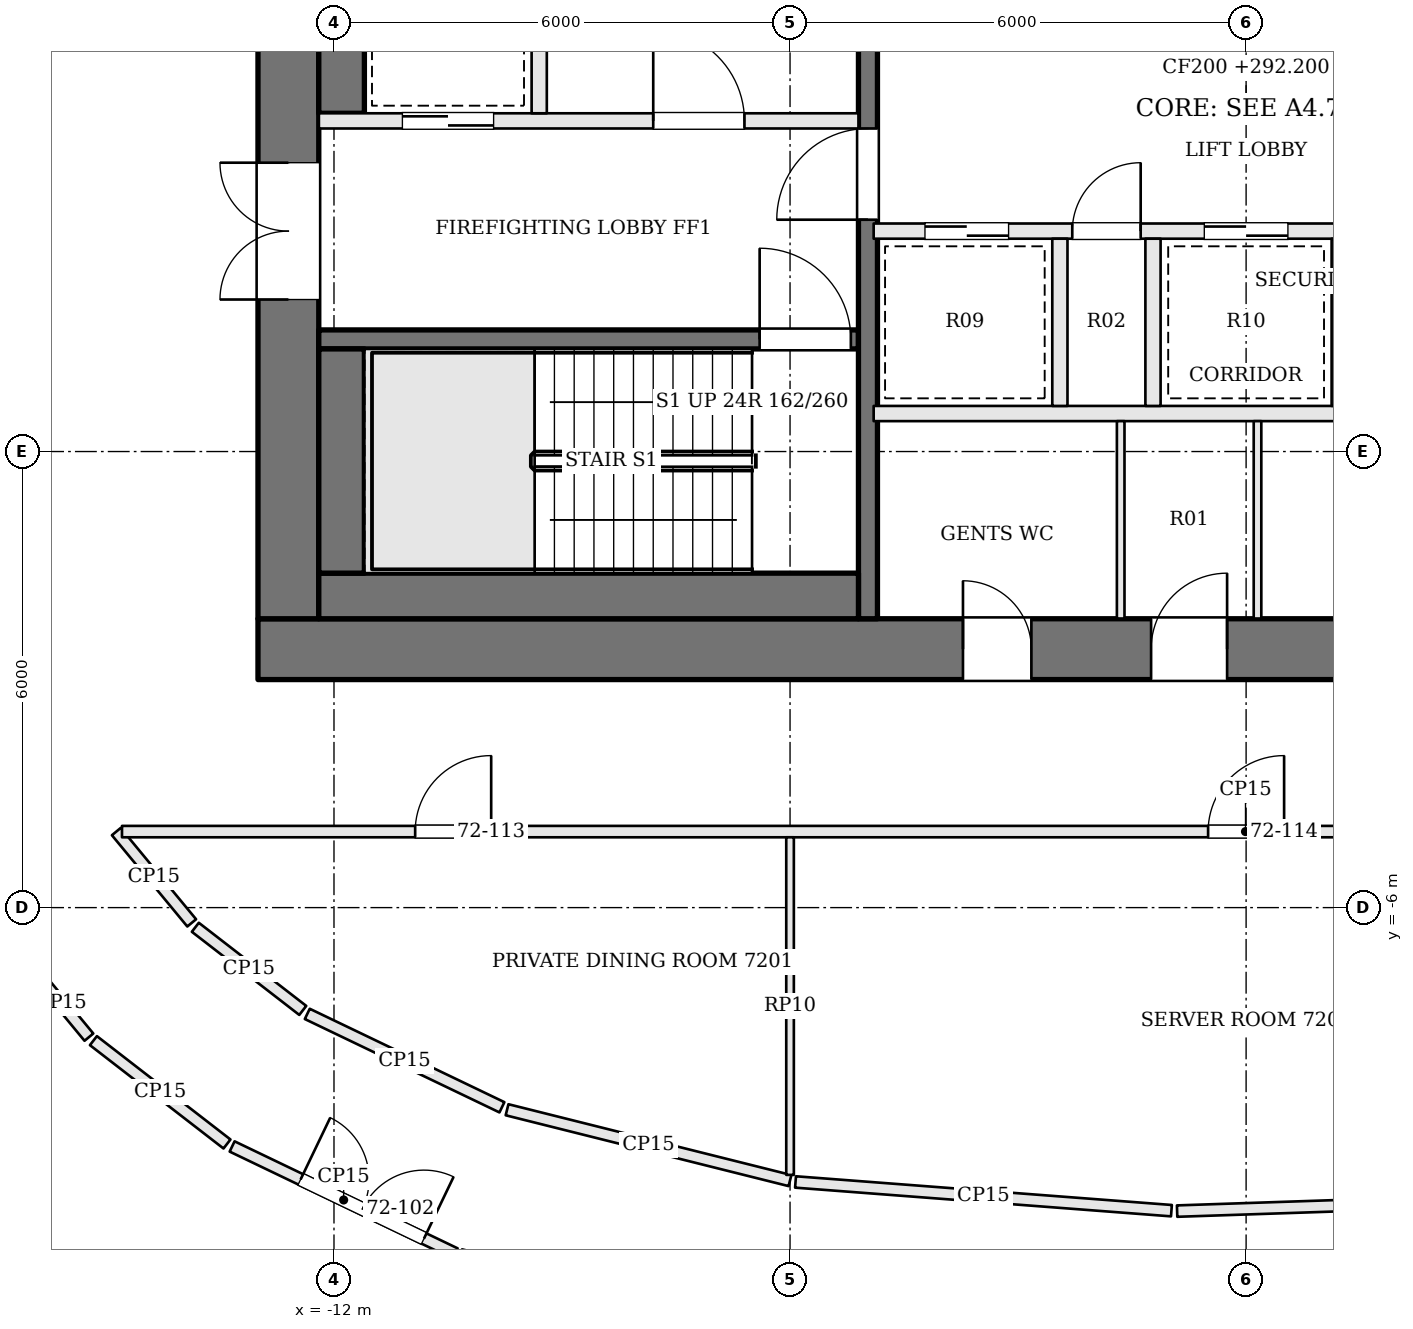
"""IFC4 building model, lengths in metres.
Left out: names, types, materials, properties, quantities, classifications, styles, units other than length and angle.
Written with IfcOpenShell. Run it as: python <this file> out.ifc"""

import sys

from ifc_helpers import new_model, si_unit, direction, frame, frame_2d, origin, place, context, subcontext, project, spatial, rectangle, extrude, element, fill, save


model = new_model("IFC4")
c1 = context("Model", 3, precision=1e-05, world=origin(), true_north=direction((0.0, 1.0)))
c2 = subcontext(c1, "Body", "Model", "MODEL_VIEW")
j1 = project(units=[si_unit("LENGTHUNIT", "METRE"), si_unit("PLANEANGLEUNIT", "RADIAN")], contexts=[c1])
p1 = place(None, origin())
s1 = spatial("IfcSite", under=j1, at=p1, CompositionType="ELEMENT")
p2 = place(p1, origin())
s2 = spatial("IfcBuilding", under=s1, at=p2, CompositionType="ELEMENT")
p3 = place(p2, frame((0.0, 0.0, 292.2)))
s3 = spatial("IfcBuildingStorey", under=s2, at=p3, CompositionType="ELEMENT", Elevation=292.2)
p4 = place(p3, frame((-13.0, -2.6, 0.0), z_axis=(0.0, 0.0, 1.0), x_axis=(1.0, 0.0, 0.0)))
e1 = element("IfcWall", 1, at=p4, inside=s3, PredefinedType="SHEAR", context=c2, shape_type="SweptSolid", body=[
    extrude(rectangle(XDim=26.0, YDim=0.8, at=frame_2d((13.0, 0.0))), origin(), (0.0, 0.0, 1.0), 3.9),
])
p5 = place(p4, frame((9.275, 0.0, 0.0)))
e2 = element("IfcOpeningElement", 2, at=p5, cuts=e1, PredefinedType="OPENING", context=c2, shape_type="SweptSolid", body=[
    extrude(rectangle(XDim=0.9, YDim=2.1, at=frame_2d((0.45, 1.05))), frame((0.0, 0.41, 0.0), z_axis=(0.0, -1.0, 0.0), x_axis=(1.0, 0.0, 0.0)), (0.0, 0.0, 1.0), 0.82),
])
p6 = place(p4, frame((11.75, 0.0, 0.0)))
e3 = element("IfcOpeningElement", 3, at=p6, cuts=e1, PredefinedType="OPENING", context=c2, shape_type="SweptSolid", body=[
    extrude(rectangle(XDim=1.0, YDim=2.1, at=frame_2d((0.5, 1.05))), frame((0.0, 0.41, 0.0), z_axis=(0.0, -1.0, 0.0), x_axis=(1.0, 0.0, 0.0)), (0.0, 0.0, 1.0), 0.82),
])
p7 = place(p4, frame((14.325, 0.0, 0.0)))
e4 = element("IfcOpeningElement", 4, at=p7, cuts=e1, PredefinedType="OPENING", context=c2, shape_type="SweptSolid", body=[
    extrude(rectangle(XDim=0.9, YDim=2.1, at=frame_2d((0.45, 1.05))), frame((0.0, 0.41, 0.0), z_axis=(0.0, -1.0, 0.0), x_axis=(1.0, 0.0, 0.0)), (0.0, 0.0, 1.0), 0.82),
])
p8 = place(p4, frame((16.7, 0.0, 0.0)))
e5 = element("IfcOpeningElement", 5, at=p8, cuts=e1, PredefinedType="OPENING", context=c2, shape_type="SweptSolid", body=[
    extrude(rectangle(XDim=0.9, YDim=2.1, at=frame_2d((0.45, 1.05))), frame((0.0, 0.41, 0.0), z_axis=(0.0, -1.0, 0.0), x_axis=(1.0, 0.0, 0.0)), (0.0, 0.0, 1.0), 0.82),
])
p9 = place(p3, frame((-12.6, -2.2, 0.0), z_axis=(0.0, 0.0, 1.0), x_axis=(0.0, 1.0, 0.0)))
e6 = element("IfcWall", 6, at=p9, inside=s3, PredefinedType="SHEAR", context=c2, shape_type="SweptSolid", body=[
    extrude(rectangle(XDim=13.4, YDim=0.8, at=frame_2d((6.7, 0.0))), origin(), (0.0, 0.0, 1.0), 3.9),
])
p10 = place(p9, frame((4.2, 0.0, 0.0)))
e7 = element("IfcOpeningElement", 7, at=p10, cuts=e6, PredefinedType="OPENING", context=c2, shape_type="SweptSolid", body=[
    extrude(rectangle(XDim=1.8, YDim=2.1, at=frame_2d((0.9, 1.05))), frame((0.0, 0.41, 0.0), z_axis=(0.0, -1.0, 0.0), x_axis=(1.0, 0.0, 0.0)), (0.0, 0.0, 1.0), 0.82),
])
p11 = place(p3, frame((-12.2, 1.475, 0.0), z_axis=(0.0, 0.0, 1.0), x_axis=(1.0, 0.0, 0.0)))
e8 = element("IfcWall", 8, at=p11, inside=s3, PredefinedType="SOLIDWALL", context=c2, shape_type="SweptSolid", body=[
    extrude(rectangle(XDim=7.1, YDim=0.25, at=frame_2d((3.55, 0.0))), origin(), (0.0, 0.0, 1.0), 3.7),
])
p12 = place(p11, frame((5.8, 0.0, 0.0)))
e9 = element("IfcOpeningElement", 9, at=p12, cuts=e8, PredefinedType="OPENING", context=c2, shape_type="SweptSolid", body=[
    extrude(rectangle(XDim=1.2, YDim=2.1, at=frame_2d((0.6, 1.05))), frame((0.0, 0.135, 0.0), z_axis=(0.0, -1.0, 0.0), x_axis=(1.0, 0.0, 0.0)), (0.0, 0.0, 1.0), 0.27),
])
p13 = place(p3, frame((-12.2, 4.35, 0.0), z_axis=(0.0, 0.0, 1.0), x_axis=(1.0, 0.0, 0.0)))
e10 = element("IfcWall", 10, at=p13, inside=s3, PredefinedType="SOLIDWALL", context=c2, shape_type="SweptSolid", body=[
    extrude(rectangle(XDim=7.1, YDim=0.2, at=frame_2d((3.55, 0.0))), origin(), (0.0, 0.0, 1.0), 3.7),
])
p14 = place(p13, frame((4.4, 0.0, 0.0)))
e11 = element("IfcOpeningElement", 11, at=p14, cuts=e10, PredefinedType="OPENING", context=c2, shape_type="SweptSolid", body=[
    extrude(rectangle(XDim=1.2, YDim=2.1, at=frame_2d((0.6, 1.05))), frame((0.0, 0.11, 0.0), z_axis=(0.0, -1.0, 0.0), x_axis=(1.0, 0.0, 0.0)), (0.0, 0.0, 1.0), 0.22),
])
p15 = place(p13, frame((1.1, 0.0, 0.0)))
e12 = element("IfcOpeningElement", 12, at=p15, cuts=e10, PredefinedType="OPENING", context=c2, shape_type="SweptSolid", body=[
    extrude(rectangle(XDim=1.2, YDim=2.1, at=frame_2d((0.6, 1.05))), frame((0.0, 0.11, 0.0), z_axis=(0.0, -1.0, 0.0), x_axis=(1.0, 0.0, 0.0)), (0.0, 0.0, 1.0), 0.22),
])
p16 = place(p3, frame((-9.3, 4.45, 0.0), z_axis=(0.0, 0.0, 1.0), x_axis=(0.0, 1.0, 0.0)))
e13 = element("IfcWall", 13, at=p16, inside=s3, PredefinedType="SOLIDWALL", context=c2, shape_type="SweptSolid", body=[
    extrude(rectangle(XDim=3.0, YDim=0.2, at=frame_2d((1.5, 0.0))), origin(), (0.0, 0.0, 1.0), 3.7),
])
p17 = place(p3, frame((-4.975, -2.2, 0.0), z_axis=(0.0, 0.0, 1.0), x_axis=(0.0, 1.0, 0.0)))
e14 = element("IfcWall", 14, at=p17, inside=s3, PredefinedType="SOLIDWALL", context=c2, shape_type="SweptSolid", body=[
    extrude(rectangle(XDim=13.4, YDim=0.25, at=frame_2d((6.7, 0.0))), origin(), (0.0, 0.0, 1.0), 3.7),
])
p18 = place(p17, frame((5.25, 0.0, 0.0)))
e15 = element("IfcOpeningElement", 15, at=p18, cuts=e14, PredefinedType="OPENING", context=c2, shape_type="SweptSolid", body=[
    extrude(rectangle(XDim=1.2, YDim=2.1, at=frame_2d((0.6, 1.05))), frame((0.0, 0.135, 0.0), z_axis=(0.0, -1.0, 0.0), x_axis=(1.0, 0.0, 0.0)), (0.0, 0.0, 1.0), 0.27),
])
p19 = place(p3, frame((-12.2, -1.9, 0.0), z_axis=(0.0, 0.0, 1.0), x_axis=(1.0, 0.0, 0.0)))
e16 = element("IfcWall", 16, at=p19, inside=s3, PredefinedType="SOLIDWALL", context=c2, shape_type="SweptSolid", body=[
    extrude(rectangle(XDim=7.1, YDim=0.6, at=frame_2d((3.55, 0.0))), origin(), (0.0, 0.0, 1.0), 3.7),
])
p20 = place(p3, frame((-11.9, -1.6, 0.0), z_axis=(0.0, 0.0, 1.0), x_axis=(0.0, 1.0, 0.0)))
e17 = element("IfcWall", 17, at=p20, inside=s3, PredefinedType="SOLIDWALL", context=c2, shape_type="SweptSolid", body=[
    extrude(rectangle(XDim=2.95, YDim=0.6, at=frame_2d((1.475, 0.0))), origin(), (0.0, 0.0, 1.0), 3.7),
])
p21 = place(p3, frame((-11.9, 4.45, 0.0), z_axis=(0.0, 0.0, 1.0), x_axis=(0.0, 1.0, 0.0)))
e18 = element("IfcWall", 18, at=p21, inside=s3, PredefinedType="SOLIDWALL", context=c2, shape_type="SweptSolid", body=[
    extrude(rectangle(XDim=3.0, YDim=0.6, at=frame_2d((1.5, 0.0))), origin(), (0.0, 0.0, 1.0), 3.7),
])
p22 = place(p3, frame((-4.9, 0.5, 0.0), z_axis=(0.0, 0.0, 1.0), x_axis=(1.0, 0.0, 0.0)))
e19 = element("IfcWall", 19, at=p22, inside=s3, PredefinedType="SOLIDWALL", context=c2, shape_type="SweptSolid", body=[
    extrude(rectangle(XDim=9.8, YDim=0.2, at=frame_2d((4.9, 0.0))), origin(), (0.0, 0.0, 1.0), 3.7),
])
p23 = place(p3, frame((-4.9, 2.9, 0.0), z_axis=(0.0, 0.0, 1.0), x_axis=(1.0, 0.0, 0.0)))
e20 = element("IfcWall", 20, at=p23, inside=s3, PredefinedType="SOLIDWALL", context=c2, shape_type="SweptSolid", body=[
    extrude(rectangle(XDim=9.8, YDim=0.2, at=frame_2d((4.9, 0.0))), origin(), (0.0, 0.0, 1.0), 3.7),
])
p24 = place(p23, frame((0.675, 0.0, 0.0)))
e21 = element("IfcOpeningElement", 21, at=p24, cuts=e20, PredefinedType="OPENING", context=c2, shape_type="SweptSolid", body=[
    extrude(rectangle(XDim=1.1, YDim=2.1, at=frame_2d((0.55, 1.05))), frame((0.0, 0.11, 0.0), z_axis=(0.0, -1.0, 0.0), x_axis=(1.0, 0.0, 0.0)), (0.0, 0.0, 1.0), 0.22),
])
p25 = place(p23, frame((2.613, 0.0, 0.0)))
e22 = element("IfcOpeningElement", 22, at=p25, cuts=e20, PredefinedType="OPENING", context=c2, shape_type="SweptSolid", body=[
    extrude(rectangle(XDim=0.9, YDim=2.1, at=frame_2d((0.45, 1.05))), frame((0.0, 0.11, 0.0), z_axis=(0.0, -1.0, 0.0), x_axis=(1.0, 0.0, 0.0)), (0.0, 0.0, 1.0), 0.22),
])
p26 = place(p23, frame((4.35, 0.0, 0.0)))
e23 = element("IfcOpeningElement", 23, at=p26, cuts=e20, PredefinedType="OPENING", context=c2, shape_type="SweptSolid", body=[
    extrude(rectangle(XDim=1.1, YDim=2.1, at=frame_2d((0.55, 1.05))), frame((0.0, 0.11, 0.0), z_axis=(0.0, -1.0, 0.0), x_axis=(1.0, 0.0, 0.0)), (0.0, 0.0, 1.0), 0.22),
])
p27 = place(p23, frame((7.463, 0.0, 0.0)))
e24 = element("IfcOpeningElement", 24, at=p27, cuts=e20, PredefinedType="OPENING", context=c2, shape_type="SweptSolid", body=[
    extrude(rectangle(XDim=1.0, YDim=2.1, at=frame_2d((0.5, 1.05))), frame((0.0, 0.11, 0.0), z_axis=(0.0, -1.0, 0.0), x_axis=(1.0, 0.0, 0.0)), (0.0, 0.0, 1.0), 0.22),
])
for number, where, z_axis, x_axis in (
    (25, (-2.45, 0.6, 0.0), (0.0, 0.0, 1.0), (0.0, 1.0, 0.0)),
    (26, (-1.225, 0.6, 0.0), (0.0, 0.0, 1.0), (0.0, 1.0, 0.0)),
    (27, (1.225, 0.6, 0.0), (0.0, 0.0, 1.0), (0.0, 1.0, 0.0)),
):
    element("IfcWall", number, at=place(p3, frame(where, z_axis=z_axis, x_axis=x_axis)), inside=s3, PredefinedType="SOLIDWALL", context=c2, shape_type="SweptSolid", body=[
        extrude(rectangle(XDim=2.2, YDim=0.2, at=frame_2d((1.1, 0.0))), origin(), (0.0, 0.0, 1.0), 3.7),
    ])
for number, where, z_axis, x_axis in (
    (28, (-1.65, -2.2, 0.0), (0.0, 0.0, 1.0), (0.0, 1.0, 0.0)),
    (29, (0.15, -2.2, 0.0), (0.0, 0.0, 1.0), (0.0, 1.0, 0.0)),
):
    element("IfcWall", number, at=place(p3, frame(where, z_axis=z_axis, x_axis=x_axis)), inside=s3, PredefinedType="PARTITIONING", context=c2, shape_type="SweptSolid", body=[
        extrude(rectangle(XDim=2.6, YDim=0.1, at=frame_2d((1.3, 0.0))), origin(), (0.0, 0.0, 1.0), 3.7),
    ])
p28 = place(p3, frame((-15.97, -6.802, 0.0), z_axis=(0.0, 0.0, 1.0), x_axis=(0.636897609689, -0.770948399552, 0.0)))
e30 = element("IfcWall", 30, at=p28, inside=s3, PredefinedType="PARTITIONING", context=c2, shape_type="SweptSolid", body=[
    extrude(rectangle(XDim=1.171, YDim=0.15, at=frame_2d((0.585, 0.0))), origin(), (0.0, 0.0, 1.0), 3.198),
])
p29 = place(p3, frame((-15.165, -7.75, 0.0), z_axis=(0.0, 0.0, 1.0), x_axis=(0.790917548929, -0.611922732701, 0.0)))
e31 = element("IfcWall", 31, at=p29, inside=s3, PredefinedType="PARTITIONING", context=c2, shape_type="SweptSolid", body=[
    extrude(rectangle(XDim=2.222, YDim=0.15, at=frame_2d((1.111, 0.0))), origin(), (0.0, 0.0, 1.0), 3.198),
])
p30 = place(p3, frame((-13.34, -9.142, 0.0), z_axis=(0.0, 0.0, 1.0), x_axis=(0.901599124721, -0.432572558425, 0.0)))
e32 = element("IfcWall", 32, at=p30, inside=s3, PredefinedType="PARTITIONING", context=c2, shape_type="SweptSolid", body=[
    extrude(rectangle(XDim=3.255, YDim=0.15, at=frame_2d((1.627, 0.0))), origin(), (0.0, 0.0, 1.0), 3.198),
])
p31 = place(p30, frame((1.0, 0.0, 0.0)))
e33 = element("IfcOpeningElement", 33, at=p31, cuts=e32, PredefinedType="OPENING", context=c2, shape_type="SweptSolid", body=[
    extrude(rectangle(XDim=1.8, YDim=2.1, at=frame_2d((0.9, 1.05))), frame((0.0, 0.085, 0.0), z_axis=(0.0, -1.0, 0.0), x_axis=(1.0, 0.0, 0.0)), (0.0, 0.0, 1.0), 0.17),
])
p32 = place(p3, frame((-10.333, -10.569, 0.0), z_axis=(0.0, 0.0, 1.0), x_axis=(0.970067398009, -0.242835836151, 0.0)))
e34 = element("IfcWall", 34, at=p32, inside=s3, PredefinedType="PARTITIONING", context=c2, shape_type="SweptSolid", body=[
    extrude(rectangle(XDim=4.209, YDim=0.15, at=frame_2d((2.105, 0.0))), origin(), (0.0, 0.0, 1.0), 3.198),
])
p33 = place(p3, frame((4.236, -9.82, 0.0), z_axis=(0.0, 0.0, 1.0), x_axis=(-0.999435760561, -0.033588100749, 0.0)))
e35 = element("IfcWall", 35, at=p33, inside=s3, PredefinedType="PARTITIONING", context=c2, shape_type="SweptSolid", body=[
    extrude(rectangle(XDim=5.146, YDim=0.15, at=frame_2d((2.573, 0.0))), origin(), (0.0, 0.0, 1.0), 3.198),
])
p34 = place(p3, frame((-0.982, -9.987, 0.0), z_axis=(0.0, 0.0, 1.0), x_axis=(-0.997096607341, 0.07614693447, 0.0)))
e36 = element("IfcWall", 36, at=p34, inside=s3, PredefinedType="PARTITIONING", context=c2, shape_type="SweptSolid", body=[
    extrude(rectangle(XDim=4.96, YDim=0.15, at=frame_2d((2.48, 0.0))), origin(), (0.0, 0.0, 1.0), 3.198),
])
p35 = place(p3, frame((-6.001, -9.591, 0.0), z_axis=(0.0, 0.0, 1.0), x_axis=(-0.970063855769, 0.242849986061, 0.0)))
e37 = element("IfcWall", 37, at=p35, inside=s3, PredefinedType="PARTITIONING", context=c2, shape_type="SweptSolid", body=[
    extrude(rectangle(XDim=3.837, YDim=0.15, at=frame_2d((1.919, 0.0))), origin(), (0.0, 0.0, 1.0), 3.198),
])
p36 = place(p3, frame((-9.791, -8.627, 0.0), z_axis=(0.0, 0.0, 1.0), x_axis=(-0.901598165215, 0.432574558292, 0.0)))
e38 = element("IfcWall", 38, at=p36, inside=s3, PredefinedType="PARTITIONING", context=c2, shape_type="SweptSolid", body=[
    extrude(rectangle(XDim=2.84, YDim=0.15, at=frame_2d((1.42, 0.0))), origin(), (0.0, 0.0, 1.0), 3.198),
])
p37 = place(p3, frame((-12.411, -7.353, 0.0), z_axis=(0.0, 0.0, 1.0), x_axis=(-0.790894311556, 0.611952766109, 0.0)))
e39 = element("IfcWall", 39, at=p37, inside=s3, PredefinedType="PARTITIONING", context=c2, shape_type="SweptSolid", body=[
    extrude(rectangle(XDim=1.787, YDim=0.15, at=frame_2d((0.894, 0.0))), origin(), (0.0, 0.0, 1.0), 3.198),
])
p38 = place(p3, frame((-13.872, -6.201, 0.0), z_axis=(0.0, 0.0, 1.0), x_axis=(-0.636832838855, 0.771001903601, 0.0)))
e40 = element("IfcWall", 40, at=p38, inside=s3, PredefinedType="PARTITIONING", context=c2, shape_type="SweptSolid", body=[
    extrude(rectangle(XDim=1.558, YDim=0.15, at=frame_2d((0.779, 0.0))), origin(), (0.0, 0.0, 1.0), 3.198),
])
p39 = place(p3, frame((-14.789, -5.0, 0.0), z_axis=(0.0, 0.0, 1.0), x_axis=(1.0, 0.0, 0.0)))
e41 = element("IfcWall", 41, at=p39, inside=s3, PredefinedType="PARTITIONING", context=c2, shape_type="SweptSolid", body=[
    extrude(rectangle(XDim=29.562, YDim=0.15, at=frame_2d((14.781, 0.0))), origin(), (0.0, 0.0, 1.0), 3.198),
])
p40 = place(p39, frame((3.857, 0.0, 0.0)))
e42 = element("IfcOpeningElement", 42, at=p40, cuts=e41, PredefinedType="OPENING", context=c2, shape_type="SweptSolid", body=[
    extrude(rectangle(XDim=1.0, YDim=2.4, at=frame_2d((0.5, 1.2))), frame((0.0, 0.085, 0.0), z_axis=(0.0, -1.0, 0.0), x_axis=(1.0, 0.0, 0.0)), (0.0, 0.0, 1.0), 0.17),
])
p41 = place(p39, frame((14.289, 0.0, 0.0)))
e43 = element("IfcOpeningElement", 43, at=p41, cuts=e41, PredefinedType="OPENING", context=c2, shape_type="SweptSolid", body=[
    extrude(rectangle(XDim=1.0, YDim=2.1, at=frame_2d((0.5, 1.05))), frame((0.0, 0.085, 0.0), z_axis=(0.0, -1.0, 0.0), x_axis=(1.0, 0.0, 0.0)), (0.0, 0.0, 1.0), 0.17),
])
p42 = place(p39, frame((24.713, 0.0, 0.0)))
e44 = element("IfcOpeningElement", 44, at=p42, cuts=e41, PredefinedType="OPENING", context=c2, shape_type="SweptSolid", body=[
    extrude(rectangle(XDim=1.0, YDim=2.4, at=frame_2d((0.5, 1.2))), frame((0.0, 0.085, 0.0), z_axis=(0.0, -1.0, 0.0), x_axis=(1.0, 0.0, 0.0)), (0.0, 0.0, 1.0), 0.17),
])
p43 = place(p3, frame((-6.0, -9.516, 0.0), z_axis=(0.0, 0.0, 1.0), x_axis=(0.0, 1.0, 0.0)))
e45 = element("IfcWall", 45, at=p43, inside=s3, PredefinedType="PARTITIONING", context=c2, shape_type="SweptSolid", body=[
    extrude(rectangle(XDim=4.441, YDim=0.1, at=frame_2d((2.221, 0.0))), origin(), (0.0, 0.0, 1.0), 3.198),
])
p44 = place(p10, origin())
e46 = element("IfcDoor", 46, at=p44, inside=s3, OperationType="DOUBLE_DOOR_SINGLE_SWING", PredefinedType="DOOR", context=c2, shape_type="SweptSolid", body=[
    extrude(rectangle(XDim=1.8, YDim=2.1, at=frame_2d((0.9, 1.05))), frame((0.0, 0.025, 0.0), z_axis=(0.0, -1.0, 0.0), x_axis=(1.0, 0.0, 0.0)), (0.0, 0.0, 1.0), 0.05),
])
fill(e7, e46)
p45 = place(p18, origin())
e47 = element("IfcDoor", 47, at=p45, inside=s3, OperationType="SINGLE_SWING_LEFT", PredefinedType="DOOR", context=c2, shape_type="SweptSolid", body=[
    extrude(rectangle(XDim=1.2, YDim=2.1, at=frame_2d((0.6, 1.05))), frame((0.0, 0.025, 0.0), z_axis=(0.0, -1.0, 0.0), x_axis=(1.0, 0.0, 0.0)), (0.0, 0.0, 1.0), 0.05),
])
fill(e15, e47)
p46 = place(p14, origin())
e48 = element("IfcDoor", 48, at=p46, inside=s3, OperationType="SINGLE_SWING_LEFT", PredefinedType="DOOR", context=c2, shape_type="SweptSolid", body=[
    extrude(rectangle(XDim=1.2, YDim=2.1, at=frame_2d((0.6, 1.05))), frame((0.0, 0.025, 0.0), z_axis=(0.0, -1.0, 0.0), x_axis=(1.0, 0.0, 0.0)), (0.0, 0.0, 1.0), 0.05),
])
fill(e11, e48)
p47 = place(p12, origin())
e49 = element("IfcDoor", 49, at=p47, inside=s3, OperationType="SINGLE_SWING_LEFT", PredefinedType="DOOR", context=c2, shape_type="SweptSolid", body=[
    extrude(rectangle(XDim=1.2, YDim=2.1, at=frame_2d((0.6, 1.05))), frame((0.0, 0.025, 0.0), z_axis=(0.0, -1.0, 0.0), x_axis=(1.0, 0.0, 0.0)), (0.0, 0.0, 1.0), 0.05),
])
fill(e9, e49)
p48 = place(p15, origin())
e50 = element("IfcDoor", 50, at=p48, inside=s3, OperationType="SLIDING_TO_RIGHT", PredefinedType="DOOR", context=c2, shape_type="SweptSolid", body=[
    extrude(rectangle(XDim=1.2, YDim=2.1, at=frame_2d((0.6, 1.05))), frame((0.0, 0.025, 0.0), z_axis=(0.0, -1.0, 0.0), x_axis=(1.0, 0.0, 0.0)), (0.0, 0.0, 1.0), 0.05),
])
fill(e12, e50)
p49 = place(p24, origin())
e51 = element("IfcDoor", 51, at=p49, inside=s3, OperationType="SLIDING_TO_RIGHT", PredefinedType="DOOR", context=c2, shape_type="SweptSolid", body=[
    extrude(rectangle(XDim=1.1, YDim=2.1, at=frame_2d((0.55, 1.05))), frame((0.0, 0.025, 0.0), z_axis=(0.0, -1.0, 0.0), x_axis=(1.0, 0.0, 0.0)), (0.0, 0.0, 1.0), 0.05),
])
fill(e21, e51)
p50 = place(p25, origin())
e52 = element("IfcDoor", 52, at=p50, inside=s3, OperationType="SINGLE_SWING_RIGHT", PredefinedType="DOOR", context=c2, shape_type="SweptSolid", body=[
    extrude(rectangle(XDim=0.9, YDim=2.1, at=frame_2d((0.45, 1.05))), frame((0.0, 0.025, 0.0), z_axis=(0.0, -1.0, 0.0), x_axis=(1.0, 0.0, 0.0)), (0.0, 0.0, 1.0), 0.05),
])
fill(e22, e52)
p51 = place(p26, origin())
e53 = element("IfcDoor", 53, at=p51, inside=s3, OperationType="SLIDING_TO_LEFT", PredefinedType="DOOR", context=c2, shape_type="SweptSolid", body=[
    extrude(rectangle(XDim=1.1, YDim=2.1, at=frame_2d((0.55, 1.05))), frame((0.0, 0.025, 0.0), z_axis=(0.0, -1.0, 0.0), x_axis=(1.0, 0.0, 0.0)), (0.0, 0.0, 1.0), 0.05),
])
fill(e23, e53)
p52 = place(p5, origin())
e54 = element("IfcDoor", 54, at=p52, inside=s3, OperationType="SINGLE_SWING_LEFT", PredefinedType="DOOR", context=c2, shape_type="SweptSolid", body=[
    extrude(rectangle(XDim=0.9, YDim=2.1, at=frame_2d((0.45, 1.05))), frame((0.0, 0.025, 0.0), z_axis=(0.0, -1.0, 0.0), x_axis=(1.0, 0.0, 0.0)), (0.0, 0.0, 1.0), 0.05),
])
fill(e2, e54)
p53 = place(p6, origin())
e55 = element("IfcDoor", 55, at=p53, inside=s3, OperationType="SINGLE_SWING_RIGHT", PredefinedType="DOOR", context=c2, shape_type="SweptSolid", body=[
    extrude(rectangle(XDim=1.0, YDim=2.1, at=frame_2d((0.5, 1.05))), frame((0.0, 0.025, 0.0), z_axis=(0.0, -1.0, 0.0), x_axis=(1.0, 0.0, 0.0)), (0.0, 0.0, 1.0), 0.05),
])
fill(e3, e55)
p54 = place(p31, origin())
e56 = element("IfcDoor", 56, at=p54, inside=s3, OperationType="DOUBLE_DOOR_SINGLE_SWING", PredefinedType="DOOR", context=c2, shape_type="SweptSolid", body=[
    extrude(rectangle(XDim=1.8, YDim=2.1, at=frame_2d((0.9, 1.05))), frame((0.0, 0.025, 0.0), z_axis=(0.0, -1.0, 0.0), x_axis=(1.0, 0.0, 0.0)), (0.0, 0.0, 1.0), 0.05),
])
fill(e33, e56)
p55 = place(p40, origin())
e57 = element("IfcDoor", 57, at=p55, inside=s3, OperationType="SINGLE_SWING_RIGHT", PredefinedType="DOOR", context=c2, shape_type="SweptSolid", body=[
    extrude(rectangle(XDim=1.0, YDim=2.4, at=frame_2d((0.5, 1.2))), frame((0.0, 0.025, 0.0), z_axis=(0.0, -1.0, 0.0), x_axis=(1.0, 0.0, 0.0)), (0.0, 0.0, 1.0), 0.05),
])
fill(e42, e57)
p56 = place(p41, origin())
e58 = element("IfcDoor", 58, at=p56, inside=s3, OperationType="SINGLE_SWING_RIGHT", PredefinedType="DOOR", context=c2, shape_type="SweptSolid", body=[
    extrude(rectangle(XDim=1.0, YDim=2.1, at=frame_2d((0.5, 1.05))), frame((0.0, 0.025, 0.0), z_axis=(0.0, -1.0, 0.0), x_axis=(1.0, 0.0, 0.0)), (0.0, 0.0, 1.0), 0.05),
])
fill(e43, e58)
save(model, sys.argv[1])
